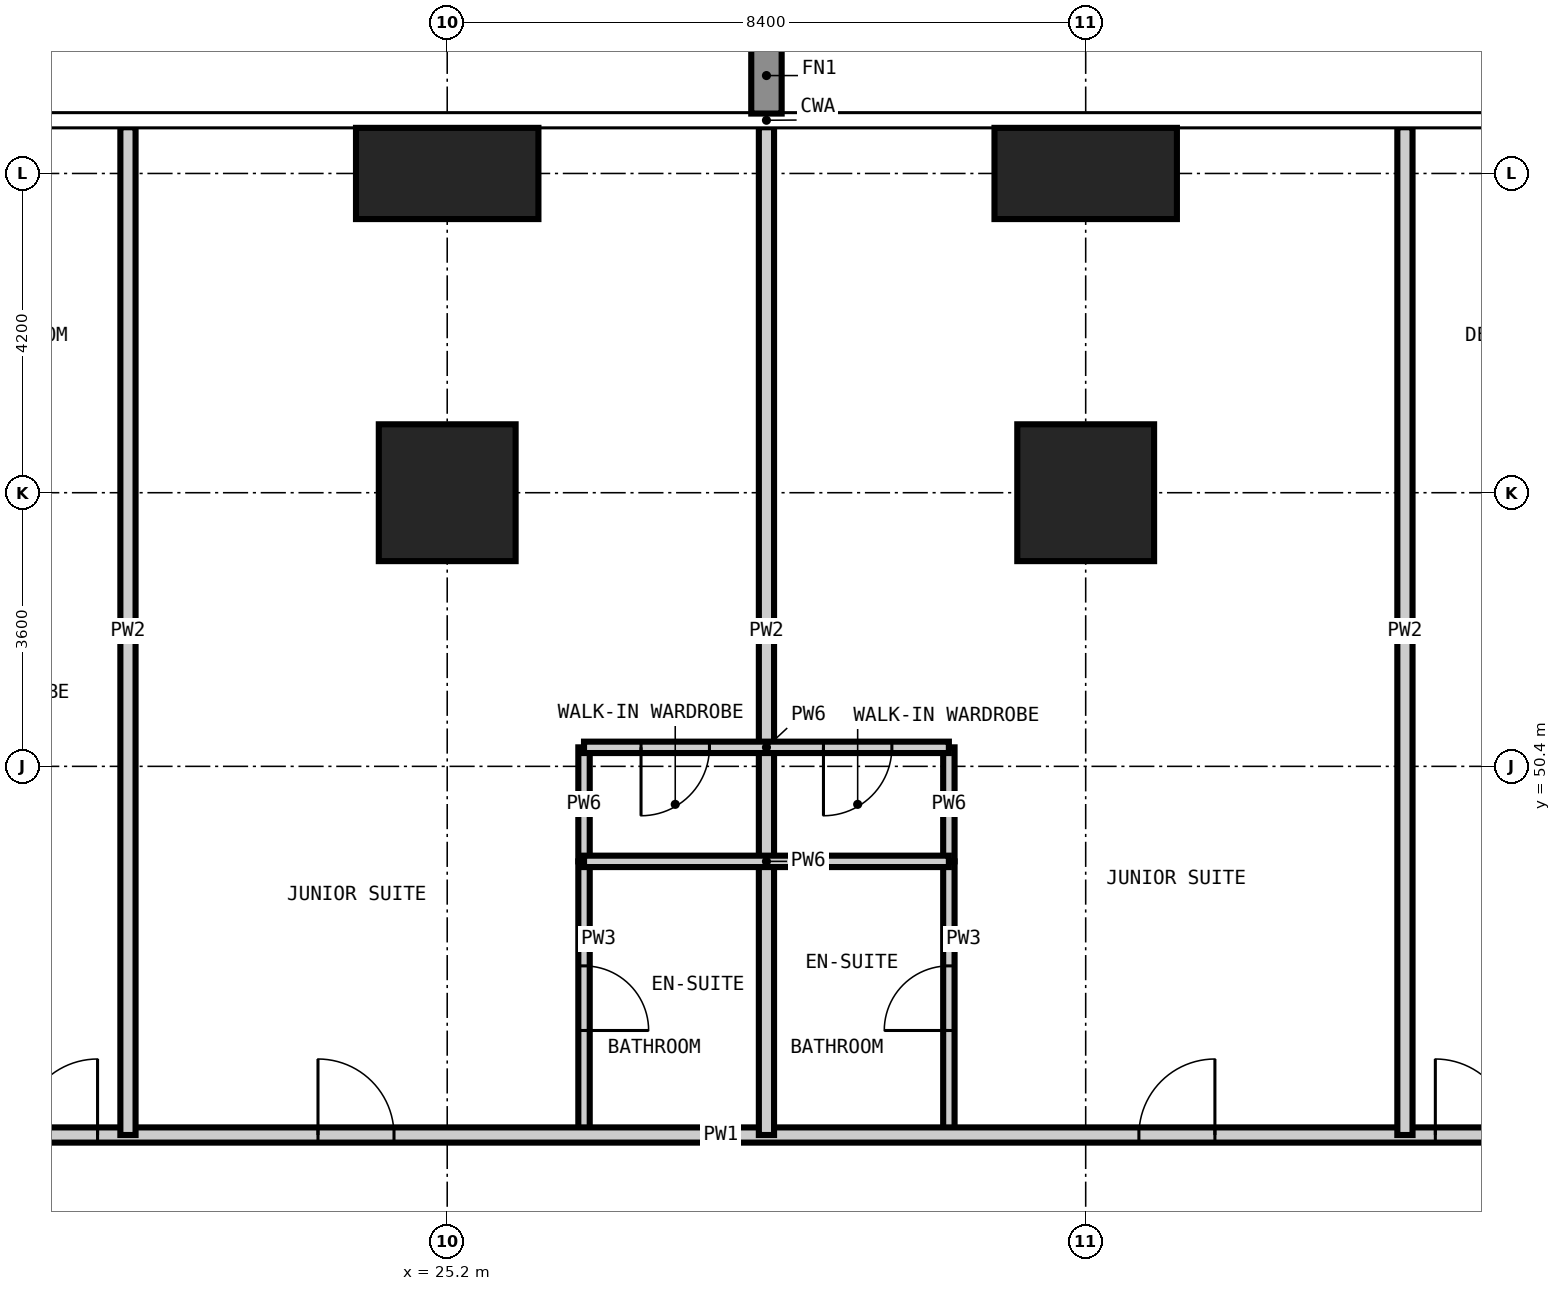
"""IFC4 building model, lengths in metres.
Left out: names, types, materials, properties, quantities, classifications, styles, units other than length and angle.
Written with IfcOpenShell. Run it as: python <this file> out.ifc"""

import sys

from ifc_helpers import new_model, si_unit, direction, frame, frame_2d, origin, origin_2d, place, context, subcontext, project, spatial, rectangle, extrude, element, fill, save


model = new_model("IFC4")
c1 = context("Model", 3, precision=1e-05, world=origin(), true_north=direction((0.0, 1.0)))
c2 = subcontext(c1, "Body", "Model", "MODEL_VIEW")
j1 = project(units=[si_unit("LENGTHUNIT", "METRE"), si_unit("PLANEANGLEUNIT", "RADIAN")], contexts=[c1])
p1 = place(None, origin())
s1 = spatial("IfcSite", under=j1, at=p1, CompositionType="ELEMENT")
p2 = place(p1, origin())
s2 = spatial("IfcBuilding", under=s1, at=p2, CompositionType="ELEMENT")
p3 = place(p2, frame((0.0, 0.0, 70.2)))
s3 = spatial("IfcBuildingStorey", under=s2, at=p3, CompositionType="ELEMENT", Elevation=70.2)
p4 = place(p3, frame((25.2, 54.0, -0.35), z_axis=(0.0, 0.0, 1.0), x_axis=(1.0, 0.0, 0.0)))
e1 = element("IfcColumn", 1, at=p4, inside=s3, PredefinedType="COLUMN", context=c2, shape_type="SweptSolid", body=[
    extrude(rectangle(XDim=1.8, YDim=1.8, at=origin_2d()), origin(), (0.0, 0.0, 1.0), 3.6),
])
p5 = place(p3, frame((25.2, 58.2, -0.35), z_axis=(0.0, 0.0, 1.0), x_axis=(1.0, 0.0, 0.0)))
e2 = element("IfcColumn", 2, at=p5, inside=s3, PredefinedType="COLUMN", context=c2, shape_type="SweptSolid", body=[
    extrude(rectangle(XDim=2.4, YDim=1.2, at=origin_2d()), origin(), (0.0, 0.0, 1.0), 3.6),
])
p6 = place(p3, frame((33.6, 54.0, -0.35), z_axis=(0.0, 0.0, 1.0), x_axis=(1.0, 0.0, 0.0)))
e3 = element("IfcColumn", 3, at=p6, inside=s3, PredefinedType="COLUMN", context=c2, shape_type="SweptSolid", body=[
    extrude(rectangle(XDim=1.8, YDim=1.8, at=origin_2d()), origin(), (0.0, 0.0, 1.0), 3.6),
])
p7 = place(p3, frame((33.6, 58.2, -0.35), z_axis=(0.0, 0.0, 1.0), x_axis=(1.0, 0.0, 0.0)))
e4 = element("IfcColumn", 4, at=p7, inside=s3, PredefinedType="COLUMN", context=c2, shape_type="SweptSolid", body=[
    extrude(rectangle(XDim=2.4, YDim=1.2, at=origin_2d()), origin(), (0.0, 0.0, 1.0), 3.6),
])
p8 = place(p3, frame((27.0, 45.55, 0.0), z_axis=(0.0, 0.0, 1.0), x_axis=(0.0, 1.0, 0.0)))
e5 = element("IfcWall", 5, at=p8, inside=s3, PredefinedType="PARTITIONING", context=c2, shape_type="SweptSolid", body=[
    extrude(rectangle(XDim=3.6, YDim=0.15, at=frame_2d((1.8, 0.0))), origin(), (0.0, 0.0, 1.0), 3.25),
])
p9 = place(p8, frame((1.375, 0.0, 0.0)))
e6 = element("IfcOpeningElement", 6, at=p9, cuts=e5, PredefinedType="OPENING", context=c2, shape_type="SweptSolid", body=[
    extrude(rectangle(XDim=0.85, YDim=2.1, at=frame_2d((0.425, 1.05))), frame((0.0, 0.085, 0.0), z_axis=(0.0, -1.0, 0.0), x_axis=(1.0, 0.0, 0.0)), (0.0, 0.0, 1.0), 0.17),
])
p10 = place(p3, frame((31.8, 45.55, 0.0), z_axis=(0.0, 0.0, 1.0), x_axis=(0.0, 1.0, 0.0)))
e7 = element("IfcWall", 7, at=p10, inside=s3, PredefinedType="PARTITIONING", context=c2, shape_type="SweptSolid", body=[
    extrude(rectangle(XDim=3.6, YDim=0.15, at=frame_2d((1.8, 0.0))), origin(), (0.0, 0.0, 1.0), 3.25),
])
p11 = place(p10, frame((1.375, 0.0, 0.0)))
e8 = element("IfcOpeningElement", 8, at=p11, cuts=e7, PredefinedType="OPENING", context=c2, shape_type="SweptSolid", body=[
    extrude(rectangle(XDim=0.85, YDim=2.1, at=frame_2d((0.425, 1.05))), frame((0.0, 0.085, 0.0), z_axis=(0.0, -1.0, 0.0), x_axis=(1.0, 0.0, 0.0)), (0.0, 0.0, 1.0), 0.17),
])
p12 = place(p3, frame((12.65, 45.55, 0.0), z_axis=(0.0, 0.0, 1.0), x_axis=(1.0, 0.0, 0.0)))
e9 = element("IfcWall", 9, at=p12, inside=s3, PredefinedType="PARTITIONING", context=c2, shape_type="SweptSolid", body=[
    extrude(rectangle(XDim=32.3, YDim=0.2, at=frame_2d((16.15, 0.0))), origin(), (0.0, 0.0, 1.0), 3.25),
])
p13 = place(p12, frame((6.95, 0.0, 0.0)))
e10 = element("IfcOpeningElement", 10, at=p13, cuts=e9, PredefinedType="OPENING", context=c2, shape_type="SweptSolid", body=[
    extrude(rectangle(XDim=1.0, YDim=2.2, at=frame_2d((0.5, 1.1))), frame((0.0, 0.11, 0.0), z_axis=(0.0, -1.0, 0.0), x_axis=(1.0, 0.0, 0.0)), (0.0, 0.0, 1.0), 0.22),
])
p14 = place(p12, frame((10.85, 0.0, 0.0)))
e11 = element("IfcOpeningElement", 11, at=p14, cuts=e9, PredefinedType="OPENING", context=c2, shape_type="SweptSolid", body=[
    extrude(rectangle(XDim=1.0, YDim=2.2, at=frame_2d((0.5, 1.1))), frame((0.0, 0.11, 0.0), z_axis=(0.0, -1.0, 0.0), x_axis=(1.0, 0.0, 0.0)), (0.0, 0.0, 1.0), 0.22),
])
p15 = place(p12, frame((21.65, 0.0, 0.0)))
e12 = element("IfcOpeningElement", 12, at=p15, cuts=e9, PredefinedType="OPENING", context=c2, shape_type="SweptSolid", body=[
    extrude(rectangle(XDim=1.0, YDim=2.2, at=frame_2d((0.5, 1.1))), frame((0.0, 0.11, 0.0), z_axis=(0.0, -1.0, 0.0), x_axis=(1.0, 0.0, 0.0)), (0.0, 0.0, 1.0), 0.22),
])
p16 = place(p12, frame((25.55, 0.0, 0.0)))
e13 = element("IfcOpeningElement", 13, at=p16, cuts=e9, PredefinedType="OPENING", context=c2, shape_type="SweptSolid", body=[
    extrude(rectangle(XDim=1.0, YDim=2.2, at=frame_2d((0.5, 1.1))), frame((0.0, 0.11, 0.0), z_axis=(0.0, -1.0, 0.0), x_axis=(1.0, 0.0, 0.0)), (0.0, 0.0, 1.0), 0.22),
])
for number, where, z_axis, x_axis in (
    (14, (21.0, 45.55, 0.0), (0.0, 0.0, 1.0), (0.0, 1.0, 0.0)),
    (15, (29.4, 45.55, 0.0), (0.0, 0.0, 1.0), (0.0, 1.0, 0.0)),
    (16, (37.8, 45.55, 0.0), (0.0, 0.0, 1.0), (0.0, 1.0, 0.0)),
):
    element("IfcWall", number, at=place(p3, frame(where, z_axis=z_axis, x_axis=x_axis)), inside=s3, PredefinedType="PARTITIONING", context=c2, shape_type="SweptSolid", body=[
        extrude(rectangle(XDim=13.258, YDim=0.2, at=frame_2d((6.629, 0.0))), origin(), (0.0, 0.0, 1.0), 3.25),
    ])
for number, where, z_axis, x_axis in (
    (17, (27.0, 49.15, 0.0), (0.0, 0.0, 1.0), (0.0, 1.0, 0.0)),
    (18, (31.8, 49.15, 0.0), (0.0, 0.0, 1.0), (0.0, 1.0, 0.0)),
):
    element("IfcWall", number, at=place(p3, frame(where, z_axis=z_axis, x_axis=x_axis)), inside=s3, PredefinedType="PARTITIONING", context=c2, shape_type="SweptSolid", body=[
        extrude(rectangle(XDim=1.5, YDim=0.15, at=frame_2d((0.75, 0.0))), origin(), (0.0, 0.0, 1.0), 3.25),
    ])
p17 = place(p3, frame((27.0, 49.15, 0.0), z_axis=(0.0, 0.0, 1.0), x_axis=(1.0, 0.0, 0.0)))
e19 = element("IfcWall", 19, at=p17, inside=s3, PredefinedType="PARTITIONING", context=c2, shape_type="SweptSolid", body=[
    extrude(rectangle(XDim=4.8, YDim=0.15, at=frame_2d((2.4, 0.0))), origin(), (0.0, 0.0, 1.0), 3.25),
])
p18 = place(p3, frame((27.0, 50.65, 0.0), z_axis=(0.0, 0.0, 1.0), x_axis=(1.0, 0.0, 0.0)))
e20 = element("IfcWall", 20, at=p18, inside=s3, PredefinedType="PARTITIONING", context=c2, shape_type="SweptSolid", body=[
    extrude(rectangle(XDim=4.8, YDim=0.15, at=frame_2d((2.4, 0.0))), origin(), (0.0, 0.0, 1.0), 3.25),
])
p19 = place(p18, frame((0.75, 0.0, 0.0)))
e21 = element("IfcOpeningElement", 21, at=p19, cuts=e20, PredefinedType="OPENING", context=c2, shape_type="SweptSolid", body=[
    extrude(rectangle(XDim=0.9, YDim=2.1, at=frame_2d((0.45, 1.05))), frame((0.0, 0.085, 0.0), z_axis=(0.0, -1.0, 0.0), x_axis=(1.0, 0.0, 0.0)), (0.0, 0.0, 1.0), 0.17),
])
p20 = place(p18, frame((3.15, 0.0, 0.0)))
e22 = element("IfcOpeningElement", 22, at=p20, cuts=e20, PredefinedType="OPENING", context=c2, shape_type="SweptSolid", body=[
    extrude(rectangle(XDim=0.9, YDim=2.1, at=frame_2d((0.45, 1.05))), frame((0.0, 0.085, 0.0), z_axis=(0.0, -1.0, 0.0), x_axis=(1.0, 0.0, 0.0)), (0.0, 0.0, 1.0), 0.17),
])
p21 = place(p13, origin())
e23 = element("IfcDoor", 23, at=p21, inside=s3, OperationType="SINGLE_SWING_RIGHT", PredefinedType="DOOR", context=c2, shape_type="SweptSolid", body=[
    extrude(rectangle(XDim=1.0, YDim=2.2, at=frame_2d((0.5, 1.1))), frame((0.0, 0.025, 0.0), z_axis=(0.0, -1.0, 0.0), x_axis=(1.0, 0.0, 0.0)), (0.0, 0.0, 1.0), 0.05),
])
fill(e10, e23)
p22 = place(p14, origin())
e24 = element("IfcDoor", 24, at=p22, inside=s3, OperationType="SINGLE_SWING_LEFT", PredefinedType="DOOR", context=c2, shape_type="SweptSolid", body=[
    extrude(rectangle(XDim=1.0, YDim=2.2, at=frame_2d((0.5, 1.1))), frame((0.0, 0.025, 0.0), z_axis=(0.0, -1.0, 0.0), x_axis=(1.0, 0.0, 0.0)), (0.0, 0.0, 1.0), 0.05),
])
fill(e11, e24)
p23 = place(p9, frame((0.85, 0.0, 0.0), z_axis=(0.0, 0.0, 1.0), x_axis=(-1.0, 0.0, 0.0)))
e25 = element("IfcDoor", 25, at=p23, inside=s3, OperationType="SINGLE_SWING_RIGHT", PredefinedType="DOOR", context=c2, shape_type="SweptSolid", body=[
    extrude(rectangle(XDim=0.85, YDim=2.1, at=frame_2d((0.425, 1.05))), frame((0.0, 0.025, 0.0), z_axis=(0.0, -1.0, 0.0), x_axis=(1.0, 0.0, 0.0)), (0.0, 0.0, 1.0), 0.05),
])
fill(e6, e25)
p24 = place(p19, frame((0.9, 0.0, 0.0), z_axis=(0.0, 0.0, 1.0), x_axis=(-1.0, 0.0, 0.0)))
e26 = element("IfcDoor", 26, at=p24, inside=s3, OperationType="SINGLE_SWING_RIGHT", PredefinedType="DOOR", context=c2, shape_type="SweptSolid", body=[
    extrude(rectangle(XDim=0.9, YDim=2.1, at=frame_2d((0.45, 1.05))), frame((0.0, 0.025, 0.0), z_axis=(0.0, -1.0, 0.0), x_axis=(1.0, 0.0, 0.0)), (0.0, 0.0, 1.0), 0.05),
])
fill(e21, e26)
p25 = place(p15, origin())
e27 = element("IfcDoor", 27, at=p25, inside=s3, OperationType="SINGLE_SWING_RIGHT", PredefinedType="DOOR", context=c2, shape_type="SweptSolid", body=[
    extrude(rectangle(XDim=1.0, YDim=2.2, at=frame_2d((0.5, 1.1))), frame((0.0, 0.025, 0.0), z_axis=(0.0, -1.0, 0.0), x_axis=(1.0, 0.0, 0.0)), (0.0, 0.0, 1.0), 0.05),
])
fill(e12, e27)
p26 = place(p11, origin())
e28 = element("IfcDoor", 28, at=p26, inside=s3, OperationType="SINGLE_SWING_LEFT", PredefinedType="DOOR", context=c2, shape_type="SweptSolid", body=[
    extrude(rectangle(XDim=0.85, YDim=2.1, at=frame_2d((0.425, 1.05))), frame((0.0, 0.025, 0.0), z_axis=(0.0, -1.0, 0.0), x_axis=(1.0, 0.0, 0.0)), (0.0, 0.0, 1.0), 0.05),
])
fill(e8, e28)
p27 = place(p20, frame((0.9, 0.0, 0.0), z_axis=(0.0, 0.0, 1.0), x_axis=(-1.0, 0.0, 0.0)))
e29 = element("IfcDoor", 29, at=p27, inside=s3, OperationType="SINGLE_SWING_RIGHT", PredefinedType="DOOR", context=c2, shape_type="SweptSolid", body=[
    extrude(rectangle(XDim=0.9, YDim=2.1, at=frame_2d((0.45, 1.05))), frame((0.0, 0.025, 0.0), z_axis=(0.0, -1.0, 0.0), x_axis=(1.0, 0.0, 0.0)), (0.0, 0.0, 1.0), 0.05),
])
fill(e22, e29)
p28 = place(p16, origin())
e30 = element("IfcDoor", 30, at=p28, inside=s3, OperationType="SINGLE_SWING_LEFT", PredefinedType="DOOR", context=c2, shape_type="SweptSolid", body=[
    extrude(rectangle(XDim=1.0, YDim=2.2, at=frame_2d((0.5, 1.1))), frame((0.0, 0.025, 0.0), z_axis=(0.0, -1.0, 0.0), x_axis=(1.0, 0.0, 0.0)), (0.0, 0.0, 1.0), 0.05),
])
fill(e13, e30)
save(model, sys.argv[1])
